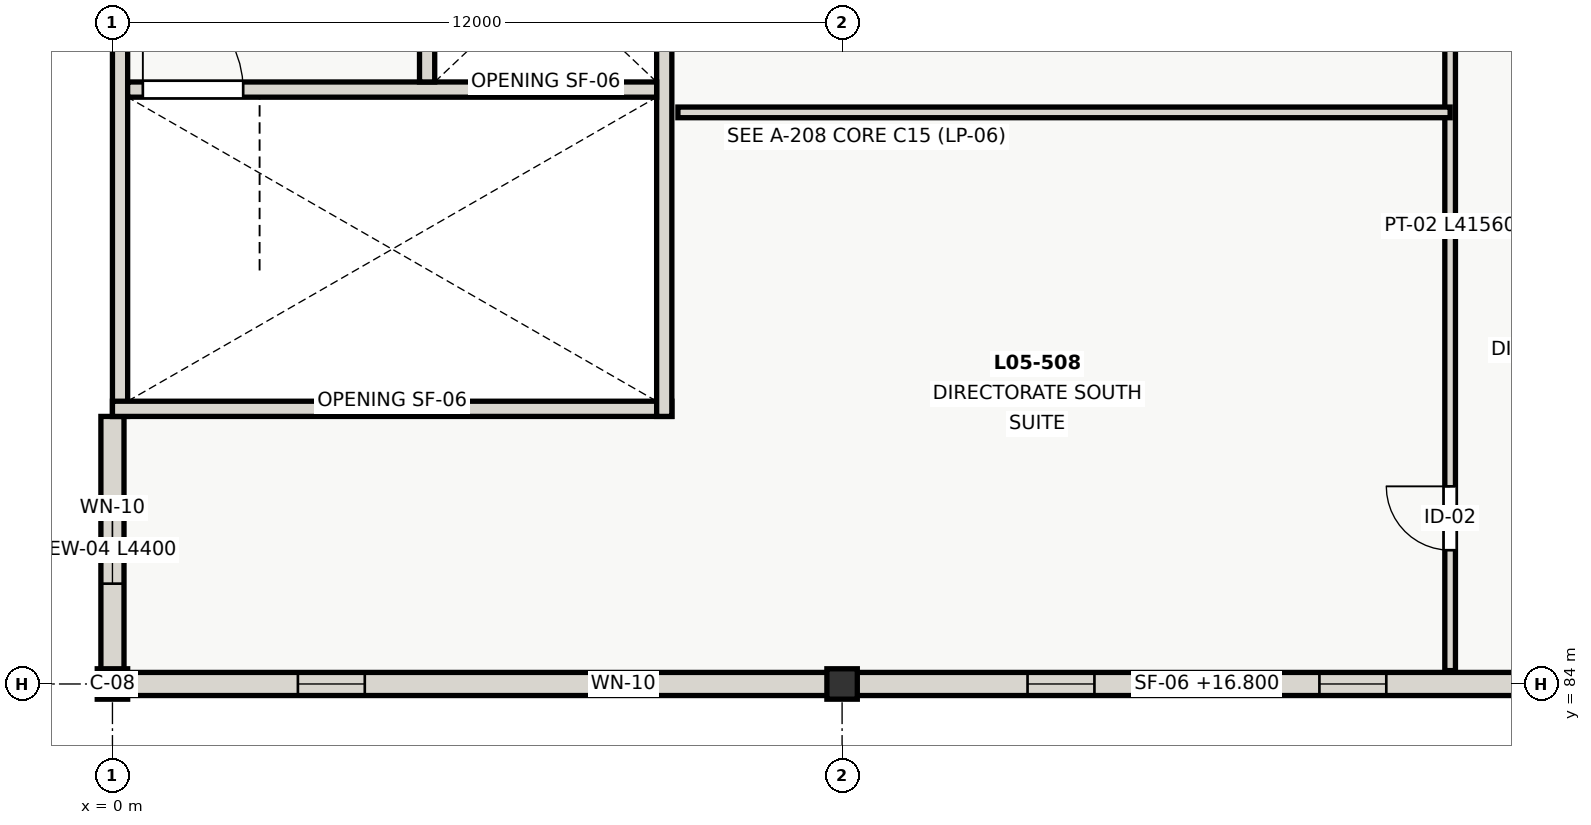
"""IFC4 building model, lengths in metres.
Left out: names, types, materials, properties, quantities, classifications, styles, units other than length and angle.
Written with IfcOpenShell. Run it as: python <this file> out.ifc"""

import sys

from ifc_helpers import new_model, si_unit, direction, frame, frame_2d, origin, origin_2d, place, context, subcontext, project, spatial, rectangle, extrude, element, fill, save


model = new_model("IFC4")
c1 = context("Model", 3, precision=1e-05, world=origin(), true_north=direction((0.0, 1.0)))
c2 = subcontext(c1, "Body", "Model", "MODEL_VIEW")
j1 = project(units=[si_unit("LENGTHUNIT", "METRE"), si_unit("PLANEANGLEUNIT", "RADIAN")], contexts=[c1])
p1 = place(None, origin())
s1 = spatial("IfcSite", under=j1, at=p1, CompositionType="ELEMENT")
p2 = place(p1, origin())
s2 = spatial("IfcBuilding", under=s1, at=p2, CompositionType="ELEMENT")
p3 = place(p2, frame((0.0, 0.0, 16.8)))
s3 = spatial("IfcBuildingStorey", under=s2, at=p3, CompositionType="ELEMENT", Elevation=16.8)
for number, where, z_axis, x_axis in (
    (1, (0.0, 84.0, 0.0), (0.0, 0.0, 1.0), (1.0, 0.0, 0.0)),
    (2, (12.0, 84.0, 0.0), (0.0, 0.0, 1.0), (1.0, 0.0, 0.0)),
):
    element("IfcColumn", number, at=place(p3, frame(where, z_axis=z_axis, x_axis=x_axis)), inside=s3, PredefinedType="COLUMN", context=c2, shape_type="SweptSolid", body=[
        extrude(rectangle(XDim=0.5, YDim=0.5, at=origin_2d()), origin(), (0.0, 0.0, 1.0), 4.2),
    ])
p4 = place(p3, frame((0.0, 84.0, 0.0), z_axis=(0.0, 0.0, 1.0), x_axis=(0.0, 1.0, 0.0)))
e3 = element("IfcWall", 3, at=p4, inside=s3, PredefinedType="SOLIDWALL", context=c2, shape_type="SweptSolid", body=[
    extrude(rectangle(XDim=4.4, YDim=0.38, at=frame_2d((2.2, 0.0))), origin(), (0.0, 0.0, 1.0), 3.525),
])
p5 = place(p4, frame((1.65, 0.0, 0.9)))
e4 = element("IfcOpeningElement", 4, at=p5, cuts=e3, PredefinedType="OPENING", context=c2, shape_type="SweptSolid", body=[
    extrude(rectangle(XDim=1.1, YDim=1.55, at=frame_2d((0.55, 0.775))), frame((0.0, 0.2, 0.0), z_axis=(0.0, -1.0, 0.0), x_axis=(1.0, 0.0, 0.0)), (0.0, 0.0, 1.0), 0.4),
])
p6 = place(p3, frame((12.0, 84.0, 0.0), z_axis=(0.0, 0.0, 1.0), x_axis=(-1.0, 0.0, 0.0)))
e5 = element("IfcWall", 5, at=p6, inside=s3, PredefinedType="SOLIDWALL", context=c2, shape_type="SweptSolid", body=[
    extrude(rectangle(XDim=12.0, YDim=0.38, at=frame_2d((6.0, 0.0))), origin(), (0.0, 0.0, 1.0), 3.555),
])
p7 = place(p6, frame((3.05, 0.0, 0.9)))
e6 = element("IfcOpeningElement", 6, at=p7, cuts=e5, PredefinedType="OPENING", context=c2, shape_type="SweptSolid", body=[
    extrude(rectangle(XDim=1.1, YDim=1.55, at=frame_2d((0.55, 0.775))), frame((0.0, 0.2, 0.0), z_axis=(0.0, -1.0, 0.0), x_axis=(1.0, 0.0, 0.0)), (0.0, 0.0, 1.0), 0.4),
])
p8 = place(p6, frame((7.85, 0.0, 0.9)))
e7 = element("IfcOpeningElement", 7, at=p8, cuts=e5, PredefinedType="OPENING", context=c2, shape_type="SweptSolid", body=[
    extrude(rectangle(XDim=1.1, YDim=1.55, at=frame_2d((0.55, 0.775))), frame((0.0, 0.2, 0.0), z_axis=(0.0, -1.0, 0.0), x_axis=(1.0, 0.0, 0.0)), (0.0, 0.0, 1.0), 0.4),
])
p9 = place(p3, frame((24.0, 84.0, 0.0), z_axis=(0.0, 0.0, 1.0), x_axis=(-1.0, 0.0, 0.0)))
e8 = element("IfcWall", 8, at=p9, inside=s3, PredefinedType="SOLIDWALL", context=c2, shape_type="SweptSolid", body=[
    extrude(rectangle(XDim=12.0, YDim=0.38, at=frame_2d((6.0, 0.0))), origin(), (0.0, 0.0, 1.0), 3.555),
])
p10 = place(p9, frame((3.05, 0.0, 0.9)))
e9 = element("IfcOpeningElement", 9, at=p10, cuts=e8, PredefinedType="OPENING", context=c2, shape_type="SweptSolid", body=[
    extrude(rectangle(XDim=1.1, YDim=1.55, at=frame_2d((0.55, 0.775))), frame((0.0, 0.2, 0.0), z_axis=(0.0, -1.0, 0.0), x_axis=(1.0, 0.0, 0.0)), (0.0, 0.0, 1.0), 0.4),
])
p11 = place(p9, frame((7.85, 0.0, 0.9)))
e10 = element("IfcOpeningElement", 10, at=p11, cuts=e8, PredefinedType="OPENING", context=c2, shape_type="SweptSolid", body=[
    extrude(rectangle(XDim=1.1, YDim=1.55, at=frame_2d((0.55, 0.775))), frame((0.0, 0.2, 0.0), z_axis=(0.0, -1.0, 0.0), x_axis=(1.0, 0.0, 0.0)), (0.0, 0.0, 1.0), 0.4),
])
p12 = place(p3, frame((0.125, 88.4, 0.0), z_axis=(0.0, 0.0, 1.0), x_axis=(0.0, 1.0, 0.0)))
e11 = element("IfcWall", 11, at=p12, inside=s3, PredefinedType="SHEAR", context=c2, shape_type="SweptSolid", body=[
    extrude(rectangle(XDim=9.2, YDim=0.25, at=frame_2d((4.6, 0.0))), origin(), (0.0, 0.0, 1.0), 4.2),
])
p13 = place(p3, frame((0.0, 88.525, 0.0), z_axis=(0.0, 0.0, 1.0), x_axis=(1.0, 0.0, 0.0)))
e12 = element("IfcWall", 12, at=p13, inside=s3, PredefinedType="SHEAR", context=c2, shape_type="SweptSolid", body=[
    extrude(rectangle(XDim=9.2, YDim=0.25, at=frame_2d((4.6, 0.0))), origin(), (0.0, 0.0, 1.0), 4.2),
])
p14 = place(p3, frame((9.075, 88.4, 0.0), z_axis=(0.0, 0.0, 1.0), x_axis=(0.0, 1.0, 0.0)))
e13 = element("IfcWall", 13, at=p14, inside=s3, PredefinedType="SHEAR", context=c2, shape_type="SweptSolid", body=[
    extrude(rectangle(XDim=9.2, YDim=0.25, at=frame_2d((4.6, 0.0))), origin(), (0.0, 0.0, 1.0), 4.2),
])
p15 = place(p3, frame((0.25, 93.775, 0.0), z_axis=(0.0, 0.0, 1.0), x_axis=(1.0, 0.0, 0.0)))
e14 = element("IfcWall", 14, at=p15, inside=s3, PredefinedType="SHEAR", context=c2, shape_type="SweptSolid", body=[
    extrude(rectangle(XDim=8.7, YDim=0.25, at=frame_2d((4.35, 0.0))), origin(), (0.0, 0.0, 1.0), 4.2),
])
p16 = place(p15, frame((0.25, 0.0, 0.0)))
e15 = element("IfcOpeningElement", 15, at=p16, cuts=e14, PredefinedType="OPENING", context=c2, shape_type="SweptSolid", body=[
    extrude(rectangle(XDim=1.65, YDim=2.1, at=frame_2d((0.825, 1.05))), frame((0.0, 0.135, 0.0), z_axis=(0.0, -1.0, 0.0), x_axis=(1.0, 0.0, 0.0)), (0.0, 0.0, 1.0), 0.27),
])
p17 = place(p3, frame((5.175, 93.9, 0.0), z_axis=(0.0, 0.0, 1.0), x_axis=(0.0, 1.0, 0.0)))
e16 = element("IfcWall", 16, at=p17, inside=s3, PredefinedType="SHEAR", context=c2, shape_type="SweptSolid", body=[
    extrude(rectangle(XDim=3.45, YDim=0.25, at=frame_2d((1.725, 0.0))), origin(), (0.0, 0.0, 1.0), 4.2),
])
p18 = place(p17, frame((1.175, 0.0, 0.0)))
e17 = element("IfcOpeningElement", 17, at=p18, cuts=e16, PredefinedType="OPENING", context=c2, shape_type="SweptSolid", body=[
    extrude(rectangle(XDim=1.1, YDim=2.1, at=frame_2d((0.55, 1.05))), frame((0.0, 0.135, 0.0), z_axis=(0.0, -1.0, 0.0), x_axis=(1.0, 0.0, 0.0)), (0.0, 0.0, 1.0), 0.27),
])
p19 = place(p3, frame((22.0, 84.22, 0.0), z_axis=(0.0, 0.0, 1.0), x_axis=(0.0, 1.0, 0.0)))
e18 = element("IfcWall", 18, at=p19, inside=s3, PredefinedType="PARTITIONING", context=c2, shape_type="SweptSolid", body=[
    extrude(rectangle(XDim=41.56, YDim=0.175, at=frame_2d((20.78, 0.0))), origin(), (0.0, 0.0, 1.0), 3.8),
])
p20 = place(p19, frame((1.98, 0.0, 0.0)))
e19 = element("IfcOpeningElement", 19, at=p20, cuts=e18, PredefinedType="OPENING", context=c2, shape_type="SweptSolid", body=[
    extrude(rectangle(XDim=1.05, YDim=2.1, at=frame_2d((0.525, 1.05))), frame((0.0, 0.097, 0.0), z_axis=(0.0, -1.0, 0.0), x_axis=(1.0, 0.0, 0.0)), (0.0, 0.0, 1.0), 0.195),
])
p21 = place(p19, frame((10.28, 0.0, 0.0)))
e20 = element("IfcOpeningElement", 20, at=p21, cuts=e18, PredefinedType="OPENING", context=c2, shape_type="SweptSolid", body=[
    extrude(rectangle(XDim=1.8, YDim=2.15, at=frame_2d((0.9, 1.075))), frame((0.0, 0.097, 0.0), z_axis=(0.0, -1.0, 0.0), x_axis=(1.0, 0.0, 0.0)), (0.0, 0.0, 1.0), 0.195),
])
p22 = place(p19, frame((14.58, 0.0, 0.0)))
e21 = element("IfcOpeningElement", 21, at=p22, cuts=e18, PredefinedType="OPENING", context=c2, shape_type="SweptSolid", body=[
    extrude(rectangle(XDim=1.05, YDim=2.1, at=frame_2d((0.525, 1.05))), frame((0.0, 0.097, 0.0), z_axis=(0.0, -1.0, 0.0), x_axis=(1.0, 0.0, 0.0)), (0.0, 0.0, 1.0), 0.195),
])
p23 = place(p19, frame((25.78, 0.0, 0.0)))
e22 = element("IfcOpeningElement", 22, at=p23, cuts=e18, PredefinedType="OPENING", context=c2, shape_type="SweptSolid", body=[
    extrude(rectangle(XDim=1.05, YDim=2.1, at=frame_2d((0.525, 1.05))), frame((0.0, 0.097, 0.0), z_axis=(0.0, -1.0, 0.0), x_axis=(1.0, 0.0, 0.0)), (0.0, 0.0, 1.0), 0.195),
])
p24 = place(p19, frame((37.98, 0.0, 0.0)))
e23 = element("IfcOpeningElement", 23, at=p24, cuts=e18, PredefinedType="OPENING", context=c2, shape_type="SweptSolid", body=[
    extrude(rectangle(XDim=1.0, YDim=2.1, at=frame_2d((0.5, 1.05))), frame((0.0, 0.097, 0.0), z_axis=(0.0, -1.0, 0.0), x_axis=(1.0, 0.0, 0.0)), (0.0, 0.0, 1.0), 0.195),
])
p25 = place(p3, frame((9.3, 93.4, 0.0), z_axis=(0.0, 0.0, 1.0), x_axis=(1.0, 0.0, 0.0)))
e24 = element("IfcWall", 24, at=p25, inside=s3, PredefinedType="PARTITIONING", context=c2, shape_type="SweptSolid", body=[
    extrude(rectangle(XDim=12.7, YDim=0.175, at=frame_2d((6.35, 0.0))), origin(), (0.0, 0.0, 1.0), 3.8),
])
p26 = place(p5, origin())
e25 = element("IfcWindow", 25, at=p26, inside=s3, PartitioningType="SINGLE_PANEL", PredefinedType="WINDOW", context=c2, shape_type="SweptSolid", body=[
    extrude(rectangle(XDim=1.1, YDim=1.55, at=frame_2d((0.55, 0.775))), frame((0.0, 0.03, 0.0), z_axis=(0.0, -1.0, 0.0), x_axis=(1.0, 0.0, 0.0)), (0.0, 0.0, 1.0), 0.06),
])
fill(e4, e25)
p27 = place(p7, origin())
e26 = element("IfcWindow", 26, at=p27, inside=s3, PartitioningType="SINGLE_PANEL", PredefinedType="WINDOW", context=c2, shape_type="SweptSolid", body=[
    extrude(rectangle(XDim=1.1, YDim=1.55, at=frame_2d((0.55, 0.775))), frame((0.0, 0.03, 0.0), z_axis=(0.0, -1.0, 0.0), x_axis=(1.0, 0.0, 0.0)), (0.0, 0.0, 1.0), 0.06),
])
fill(e6, e26)
p28 = place(p8, origin())
e27 = element("IfcWindow", 27, at=p28, inside=s3, PartitioningType="SINGLE_PANEL", PredefinedType="WINDOW", context=c2, shape_type="SweptSolid", body=[
    extrude(rectangle(XDim=1.1, YDim=1.55, at=frame_2d((0.55, 0.775))), frame((0.0, 0.03, 0.0), z_axis=(0.0, -1.0, 0.0), x_axis=(1.0, 0.0, 0.0)), (0.0, 0.0, 1.0), 0.06),
])
fill(e7, e27)
p29 = place(p10, origin())
e28 = element("IfcWindow", 28, at=p29, inside=s3, PartitioningType="SINGLE_PANEL", PredefinedType="WINDOW", context=c2, shape_type="SweptSolid", body=[
    extrude(rectangle(XDim=1.1, YDim=1.55, at=frame_2d((0.55, 0.775))), frame((0.0, 0.03, 0.0), z_axis=(0.0, -1.0, 0.0), x_axis=(1.0, 0.0, 0.0)), (0.0, 0.0, 1.0), 0.06),
])
fill(e9, e28)
p30 = place(p11, origin())
e29 = element("IfcWindow", 29, at=p30, inside=s3, PartitioningType="SINGLE_PANEL", PredefinedType="WINDOW", context=c2, shape_type="SweptSolid", body=[
    extrude(rectangle(XDim=1.1, YDim=1.55, at=frame_2d((0.55, 0.775))), frame((0.0, 0.03, 0.0), z_axis=(0.0, -1.0, 0.0), x_axis=(1.0, 0.0, 0.0)), (0.0, 0.0, 1.0), 0.06),
])
fill(e10, e29)
p31 = place(p16, origin())
e30 = element("IfcDoor", 30, at=p31, inside=s3, OperationType="SINGLE_SWING_LEFT", PredefinedType="DOOR", context=c2, shape_type="SweptSolid", body=[
    extrude(rectangle(XDim=1.65, YDim=2.1, at=frame_2d((0.825, 1.05))), frame((0.0, 0.025, 0.0), z_axis=(0.0, -1.0, 0.0), x_axis=(1.0, 0.0, 0.0)), (0.0, 0.0, 1.0), 0.05),
])
fill(e15, e30)
p32 = place(p20, origin())
e31 = element("IfcDoor", 31, at=p32, inside=s3, OperationType="SINGLE_SWING_RIGHT", PredefinedType="DOOR", context=c2, shape_type="SweptSolid", body=[
    extrude(rectangle(XDim=1.05, YDim=2.1, at=frame_2d((0.525, 1.05))), frame((0.0, 0.025, 0.0), z_axis=(0.0, -1.0, 0.0), x_axis=(1.0, 0.0, 0.0)), (0.0, 0.0, 1.0), 0.05),
])
fill(e19, e31)
save(model, sys.argv[1])
